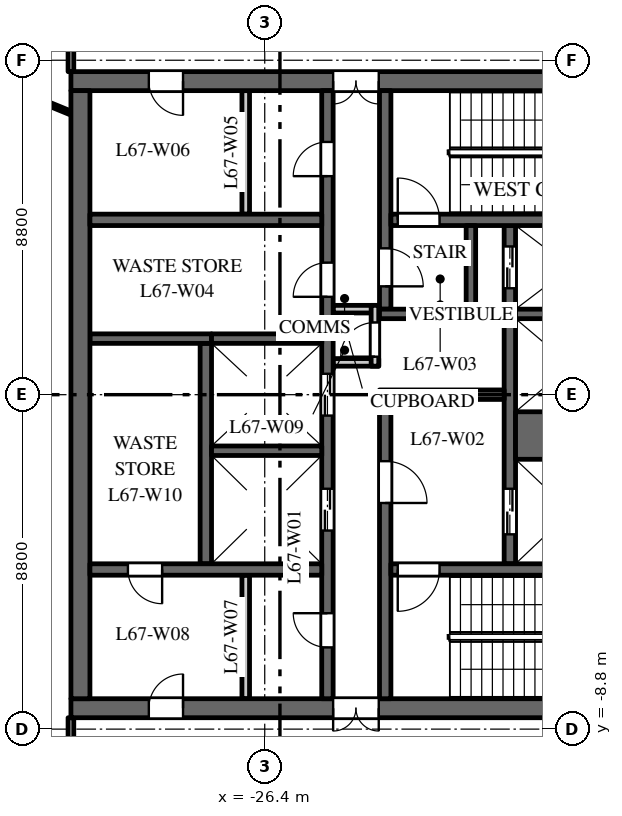
"""IFC4 building model, lengths in metres.
Left out: names, types, materials, properties, quantities, classifications, styles, units other than length and angle.
Written with IfcOpenShell. Run it as: python <this file> out.ifc"""

import sys

from ifc_helpers import new_model, si_unit, direction, frame, frame_2d, origin, place, context, subcontext, project, spatial, rectangle, extrude, element, fill, save


model = new_model("IFC4")
c1 = context("Model", 3, precision=1e-05, world=origin(), true_north=direction((0.0, 1.0)))
c2 = subcontext(c1, "Body", "Model", "MODEL_VIEW")
j1 = project(units=[si_unit("LENGTHUNIT", "METRE"), si_unit("PLANEANGLEUNIT", "RADIAN")], contexts=[c1])
p1 = place(None, origin())
s1 = spatial("IfcSite", under=j1, at=p1, CompositionType="ELEMENT")
p2 = place(p1, origin())
s2 = spatial("IfcBuilding", under=s1, at=p2, CompositionType="ELEMENT")
p3 = place(p2, frame((0.0, 0.0, 311.0)))
s3 = spatial("IfcBuildingStorey", under=s2, at=p3, CompositionType="ELEMENT", Elevation=311.0)
p4 = place(p3, frame((-16.5, 8.25, 0.0), z_axis=(0.0, 0.0, 1.0), x_axis=(-1.0, 0.0, 0.0)))
e1 = element("IfcWall", 1, at=p4, inside=s3, PredefinedType="SHEAR", context=c2, shape_type="SweptSolid", body=[
    extrude(rectangle(XDim=15.0, YDim=0.5, at=frame_2d((7.5, 0.0))), origin(), (0.0, 0.0, 1.0), 3.7),
])
p5 = place(p4, frame((6.9, 0.0, 0.0)))
e2 = element("IfcOpeningElement", 2, at=p5, cuts=e1, PredefinedType="OPENING", context=c2, shape_type="SweptSolid", body=[
    extrude(rectangle(XDim=1.2, YDim=2.1, at=frame_2d((0.6, 1.05))), frame((0.0, 0.26, 0.0), z_axis=(0.0, -1.0, 0.0), x_axis=(1.0, 0.0, 0.0)), (0.0, 0.0, 1.0), 0.52),
])
p6 = place(p4, frame((12.05, 0.0, 0.0)))
e3 = element("IfcOpeningElement", 3, at=p6, cuts=e1, PredefinedType="OPENING", context=c2, shape_type="SweptSolid", body=[
    extrude(rectangle(XDim=0.9, YDim=2.1, at=frame_2d((0.45, 1.05))), frame((0.0, 0.26, 0.0), z_axis=(0.0, -1.0, 0.0), x_axis=(1.0, 0.0, 0.0)), (0.0, 0.0, 1.0), 0.52),
])
p7 = place(p3, frame((-16.5, -8.25, 0.0), z_axis=(0.0, 0.0, 1.0), x_axis=(-1.0, 0.0, 0.0)))
e4 = element("IfcWall", 4, at=p7, inside=s3, PredefinedType="SHEAR", context=c2, shape_type="SweptSolid", body=[
    extrude(rectangle(XDim=15.0, YDim=0.5, at=frame_2d((7.5, 0.0))), origin(), (0.0, 0.0, 1.0), 3.7),
])
p8 = place(p7, frame((6.9, 0.0, 0.0)))
e5 = element("IfcOpeningElement", 5, at=p8, cuts=e4, PredefinedType="OPENING", context=c2, shape_type="SweptSolid", body=[
    extrude(rectangle(XDim=1.2, YDim=2.1, at=frame_2d((0.6, 1.05))), frame((0.0, 0.26, 0.0), z_axis=(0.0, -1.0, 0.0), x_axis=(1.0, 0.0, 0.0)), (0.0, 0.0, 1.0), 0.52),
])
p9 = place(p7, frame((12.05, 0.0, 0.0)))
e6 = element("IfcOpeningElement", 6, at=p9, cuts=e4, PredefinedType="OPENING", context=c2, shape_type="SweptSolid", body=[
    extrude(rectangle(XDim=0.9, YDim=2.1, at=frame_2d((0.45, 1.05))), frame((0.0, 0.26, 0.0), z_axis=(0.0, -1.0, 0.0), x_axis=(1.0, 0.0, 0.0)), (0.0, 0.0, 1.0), 0.52),
])
p10 = place(p3, frame((-27.95, -4.45, 0.0), z_axis=(0.0, 0.0, 1.0), x_axis=(0.0, 1.0, 0.0)))
e7 = element("IfcWall", 7, at=p10, inside=s3, PredefinedType="SHEAR", context=c2, shape_type="SweptSolid", body=[
    extrude(rectangle(XDim=5.8, YDim=0.3, at=frame_2d((2.9, 0.0))), origin(), (0.0, 0.0, 1.0), 3.7),
])
p11 = place(p3, frame((-27.8, 1.475, 0.0), z_axis=(0.0, 0.0, 1.0), x_axis=(-1.0, 0.0, 0.0)))
e8 = element("IfcWall", 8, at=p11, inside=s3, PredefinedType="SHEAR", context=c2, shape_type="SweptSolid", body=[
    extrude(rectangle(XDim=3.2, YDim=0.25, at=frame_2d((1.6, 0.0))), origin(), (0.0, 0.0, 1.0), 3.7),
])
p12 = place(p3, frame((-19.95, -4.45, 0.0), z_axis=(0.0, 0.0, 1.0), x_axis=(0.0, 1.0, 0.0)))
e9 = element("IfcWall", 9, at=p12, inside=s3, PredefinedType="SHEAR", context=c2, shape_type="SweptSolid", body=[
    extrude(rectangle(XDim=8.9, YDim=0.3, at=frame_2d((4.45, 0.0))), origin(), (0.0, 0.0, 1.0), 3.7),
])
p13 = place(p12, frame((0.775, 0.0, 0.0)))
e10 = element("IfcOpeningElement", 10, at=p13, cuts=e9, PredefinedType="OPENING", context=c2, shape_type="SweptSolid", body=[
    extrude(rectangle(XDim=1.2, YDim=2.1, at=frame_2d((0.6, 1.05))), frame((0.0, 0.16, 0.0), z_axis=(0.0, -1.0, 0.0), x_axis=(1.0, 0.0, 0.0)), (0.0, 0.0, 1.0), 0.32),
])
p14 = place(p12, frame((7.25, 0.0, 0.0)))
e11 = element("IfcOpeningElement", 11, at=p14, cuts=e9, PredefinedType="OPENING", context=c2, shape_type="SweptSolid", body=[
    extrude(rectangle(XDim=1.1, YDim=2.1, at=frame_2d((0.55, 1.05))), frame((0.0, 0.16, 0.0), z_axis=(0.0, -1.0, 0.0), x_axis=(1.0, 0.0, 0.0)), (0.0, 0.0, 1.0), 0.32),
])
p15 = place(p3, frame((-24.75, -8.0, 0.0), z_axis=(0.0, 0.0, 1.0), x_axis=(0.0, 1.0, 0.0)))
e12 = element("IfcWall", 12, at=p15, inside=s3, PredefinedType="SHEAR", context=c2, shape_type="SweptSolid", body=[
    extrude(rectangle(XDim=16.0, YDim=0.3, at=frame_2d((8.0, 0.0))), origin(), (0.0, 0.0, 1.0), 3.7),
])
p16 = place(p15, frame((4.425, 0.0, 0.0)))
e13 = element("IfcOpeningElement", 13, at=p16, cuts=e12, PredefinedType="OPENING", context=c2, shape_type="SweptSolid", body=[
    extrude(rectangle(XDim=1.1, YDim=2.1, at=frame_2d((0.55, 1.05))), frame((0.0, 0.16, 0.0), z_axis=(0.0, -1.0, 0.0), x_axis=(1.0, 0.0, 0.0)), (0.0, 0.0, 1.0), 0.32),
])
p17 = place(p15, frame((7.45, 0.0, 0.0)))
e14 = element("IfcOpeningElement", 14, at=p17, cuts=e12, PredefinedType="OPENING", context=c2, shape_type="SweptSolid", body=[
    extrude(rectangle(XDim=1.1, YDim=2.1, at=frame_2d((0.55, 1.05))), frame((0.0, 0.16, 0.0), z_axis=(0.0, -1.0, 0.0), x_axis=(1.0, 0.0, 0.0)), (0.0, 0.0, 1.0), 0.32),
])
p18 = place(p15, frame((10.575, 0.0, 0.0)))
e15 = element("IfcOpeningElement", 15, at=p18, cuts=e12, PredefinedType="OPENING", context=c2, shape_type="SweptSolid", body=[
    extrude(rectangle(XDim=0.9, YDim=2.1, at=frame_2d((0.45, 1.05))), frame((0.0, 0.16, 0.0), z_axis=(0.0, -1.0, 0.0), x_axis=(1.0, 0.0, 0.0)), (0.0, 0.0, 1.0), 0.32),
])
p19 = place(p15, frame((13.75, 0.0, 0.0)))
e16 = element("IfcOpeningElement", 16, at=p19, cuts=e12, PredefinedType="OPENING", context=c2, shape_type="SweptSolid", body=[
    extrude(rectangle(XDim=0.9, YDim=2.1, at=frame_2d((0.45, 1.05))), frame((0.0, 0.16, 0.0), z_axis=(0.0, -1.0, 0.0), x_axis=(1.0, 0.0, 0.0)), (0.0, 0.0, 1.0), 0.32),
])
p20 = place(p15, frame((1.35, 0.0, 0.0)))
e17 = element("IfcOpeningElement", 17, at=p20, cuts=e12, PredefinedType="OPENING", context=c2, shape_type="SweptSolid", body=[
    extrude(rectangle(XDim=0.9, YDim=2.1, at=frame_2d((0.45, 1.05))), frame((0.0, 0.16, 0.0), z_axis=(0.0, -1.0, 0.0), x_axis=(1.0, 0.0, 0.0)), (0.0, 0.0, 1.0), 0.32),
])
p21 = place(p3, frame((-20.1, 0.0, 0.0), z_axis=(0.0, 0.0, 1.0), x_axis=(-1.0, 0.0, 0.0)))
e18 = element("IfcWall", 18, at=p21, inside=s3, PredefinedType="SHEAR", context=c2, shape_type="SweptSolid", body=[
    extrude(rectangle(XDim=3.28, YDim=0.25, at=frame_2d((1.64, 0.0))), origin(), (0.0, 0.0, 1.0), 3.7),
])
for number, where, z_axis, x_axis in (
    (19, (-23.4, 0.85, 0.0), (0.0, 0.0, 1.0), (-1.0, 0.0, 0.0)),
    (20, (-23.4, 2.25, 0.0), (0.0, 0.0, 1.0), (-1.0, 0.0, 0.0)),
):
    element("IfcWall", number, at=place(p3, frame(where, z_axis=z_axis, x_axis=x_axis)), inside=s3, PredefinedType="PARTITIONING", context=c2, shape_type="SweptSolid", body=[
        extrude(rectangle(XDim=1.2, YDim=0.2, at=frame_2d((0.6, 0.0))), origin(), (0.0, 0.0, 1.0), 3.7),
    ])
p22 = place(p3, frame((-23.5, 0.75, 0.0), z_axis=(0.0, 0.0, 1.0), x_axis=(0.0, 1.0, 0.0)))
e21 = element("IfcWall", 21, at=p22, inside=s3, PredefinedType="PARTITIONING", context=c2, shape_type="SweptSolid", body=[
    extrude(rectangle(XDim=1.6, YDim=0.2, at=frame_2d((0.8, 0.0))), origin(), (0.0, 0.0, 1.0), 3.7),
])
p23 = place(p22, frame((0.25, 0.0, 0.0)))
e22 = element("IfcOpeningElement", 22, at=p23, cuts=e21, PredefinedType="OPENING", context=c2, shape_type="SweptSolid", body=[
    extrude(rectangle(XDim=0.9, YDim=2.1, at=frame_2d((0.45, 1.05))), frame((0.0, 0.11, 0.0), z_axis=(0.0, -1.0, 0.0), x_axis=(1.0, 0.0, 0.0)), (0.0, 0.0, 1.0), 0.22),
])
p24 = place(p3, frame((-31.25, -8.0, 0.0), z_axis=(0.0, 0.0, 1.0), x_axis=(0.0, 1.0, 0.0)))
e23 = element("IfcWall", 23, at=p24, inside=s3, PredefinedType="SHEAR", context=c2, shape_type="SweptSolid", body=[
    extrude(rectangle(XDim=16.0, YDim=0.5, at=frame_2d((8.0, 0.0))), origin(), (0.0, 0.0, 1.0), 3.7),
])
p25 = place(p3, frame((-24.9, 4.6, 0.0), z_axis=(0.0, 0.0, 1.0), x_axis=(-1.0, 0.0, 0.0)))
e24 = element("IfcWall", 24, at=p25, inside=s3, PredefinedType="SHEAR", context=c2, shape_type="SweptSolid", body=[
    extrude(rectangle(XDim=6.1, YDim=0.3, at=frame_2d((3.05, 0.0))), origin(), (0.0, 0.0, 1.0), 3.7),
])
for number, where, z_axis, x_axis in (
    (25, (-26.9, 4.75, 0.0), (0.0, 0.0, 1.0), (0.0, 1.0, 0.0)),
    (26, (-26.9, -8.0, 0.0), (0.0, 0.0, 1.0), (0.0, 1.0, 0.0)),
):
    element("IfcWall", number, at=place(p3, frame(where, z_axis=z_axis, x_axis=x_axis)), inside=s3, PredefinedType="PARTITIONING", context=c2, shape_type="SweptSolid", body=[
        extrude(rectangle(XDim=3.25, YDim=0.2, at=frame_2d((1.625, 0.0))), origin(), (0.0, 0.0, 1.0), 3.7),
    ])
p26 = place(p3, frame((-24.9, -4.6, 0.0), z_axis=(0.0, 0.0, 1.0), x_axis=(-1.0, 0.0, 0.0)))
e27 = element("IfcWall", 27, at=p26, inside=s3, PredefinedType="SHEAR", context=c2, shape_type="SweptSolid", body=[
    extrude(rectangle(XDim=6.1, YDim=0.3, at=frame_2d((3.05, 0.0))), origin(), (0.0, 0.0, 1.0), 3.7),
])
p27 = place(p26, frame((4.2, 0.0, 0.0)))
e28 = element("IfcOpeningElement", 28, at=p27, cuts=e27, PredefinedType="OPENING", context=c2, shape_type="SweptSolid", body=[
    extrude(rectangle(XDim=0.9, YDim=2.1, at=frame_2d((0.45, 1.05))), frame((0.0, 0.16, 0.0), z_axis=(0.0, -1.0, 0.0), x_axis=(1.0, 0.0, 0.0)), (0.0, 0.0, 1.0), 0.32),
])
p28 = place(p3, frame((-16.9, -1.075, 0.0), z_axis=(0.0, 0.0, 1.0), x_axis=(-1.0, 0.0, 0.0)))
e29 = element("IfcWall", 29, at=p28, inside=s3, PredefinedType="SHEAR", context=c2, shape_type="SweptSolid", body=[
    extrude(rectangle(XDim=2.9, YDim=1.25, at=frame_2d((1.45, 0.0))), origin(), (0.0, 0.0, 1.0), 3.7),
])
for number, where, z_axis, x_axis in (
    (30, (-16.9, 2.125, 0.0), (0.0, 0.0, 1.0), (-1.0, 0.0, 0.0)),
    (31, (-24.9, -1.475, 0.0), (0.0, 0.0, 1.0), (-1.0, 0.0, 0.0)),
    (32, (-24.9, 1.475, 0.0), (0.0, 0.0, 1.0), (-1.0, 0.0, 0.0)),
):
    element("IfcWall", number, at=place(p3, frame(where, z_axis=z_axis, x_axis=x_axis)), inside=s3, PredefinedType="SHEAR", context=c2, shape_type="SweptSolid", body=[
        extrude(rectangle(XDim=2.9, YDim=0.25, at=frame_2d((1.45, 0.0))), origin(), (0.0, 0.0, 1.0), 3.7),
    ])
p29 = place(p3, frame((-23.23, 2.25, 0.0), z_axis=(0.0, 0.0, 1.0), x_axis=(0.0, 1.0, 0.0)))
e33 = element("IfcWall", 33, at=p29, inside=s3, PredefinedType="SHEAR", context=c2, shape_type="SweptSolid", body=[
    extrude(rectangle(XDim=5.75, YDim=0.3, at=frame_2d((2.875, 0.0))), origin(), (0.0, 0.0, 1.0), 3.7),
])
p30 = place(p29, frame((0.6, 0.0, 0.0)))
e34 = element("IfcOpeningElement", 34, at=p30, cuts=e33, PredefinedType="OPENING", context=c2, shape_type="SweptSolid", body=[
    extrude(rectangle(XDim=1.0, YDim=2.1, at=frame_2d((0.5, 1.05))), frame((0.0, 0.16, 0.0), z_axis=(0.0, -1.0, 0.0), x_axis=(1.0, 0.0, 0.0)), (0.0, 0.0, 1.0), 0.32),
])
p31 = place(p3, frame((-23.23, -8.0, 0.0), z_axis=(0.0, 0.0, 1.0), x_axis=(0.0, 1.0, 0.0)))
e35 = element("IfcWall", 35, at=p31, inside=s3, PredefinedType="SHEAR", context=c2, shape_type="SweptSolid", body=[
    extrude(rectangle(XDim=7.875, YDim=0.3, at=frame_2d((3.938, 0.0))), origin(), (0.0, 0.0, 1.0), 3.7),
])
p32 = place(p31, frame((5.15, 0.0, 0.0)))
e36 = element("IfcOpeningElement", 36, at=p32, cuts=e35, PredefinedType="OPENING", context=c2, shape_type="SweptSolid", body=[
    extrude(rectangle(XDim=1.1, YDim=2.1, at=frame_2d((0.55, 1.05))), frame((0.0, 0.16, 0.0), z_axis=(0.0, -1.0, 0.0), x_axis=(1.0, 0.0, 0.0)), (0.0, 0.0, 1.0), 0.32),
])
p33 = place(p3, frame((-16.9, 4.6, 0.0), z_axis=(0.0, 0.0, 1.0), x_axis=(-1.0, 0.0, 0.0)))
e37 = element("IfcWall", 37, at=p33, inside=s3, PredefinedType="SHEAR", context=c2, shape_type="SweptSolid", body=[
    extrude(rectangle(XDim=6.18, YDim=0.3, at=frame_2d((3.09, 0.0))), origin(), (0.0, 0.0, 1.0), 3.7),
])
p34 = place(p33, frame((4.9, 0.0, 0.0)))
e38 = element("IfcOpeningElement", 38, at=p34, cuts=e37, PredefinedType="OPENING", context=c2, shape_type="SweptSolid", body=[
    extrude(rectangle(XDim=1.1, YDim=2.1, at=frame_2d((0.55, 1.05))), frame((0.0, 0.16, 0.0), z_axis=(0.0, -1.0, 0.0), x_axis=(1.0, 0.0, 0.0)), (0.0, 0.0, 1.0), 0.32),
])
p35 = place(p3, frame((-16.9, -4.6, 0.0), z_axis=(0.0, 0.0, 1.0), x_axis=(-1.0, 0.0, 0.0)))
e39 = element("IfcWall", 39, at=p35, inside=s3, PredefinedType="SHEAR", context=c2, shape_type="SweptSolid", body=[
    extrude(rectangle(XDim=6.18, YDim=0.3, at=frame_2d((3.09, 0.0))), origin(), (0.0, 0.0, 1.0), 3.7),
])
p36 = place(p35, frame((4.9, 0.0, 0.0)))
e40 = element("IfcOpeningElement", 40, at=p36, cuts=e39, PredefinedType="OPENING", context=c2, shape_type="SweptSolid", body=[
    extrude(rectangle(XDim=1.1, YDim=2.1, at=frame_2d((0.55, 1.05))), frame((0.0, 0.16, 0.0), z_axis=(0.0, -1.0, 0.0), x_axis=(1.0, 0.0, 0.0)), (0.0, 0.0, 1.0), 0.32),
])
p37 = place(p3, frame((-20.85, 2.125, 0.0), z_axis=(0.0, 0.0, 1.0), x_axis=(-1.0, 0.0, 0.0)))
e41 = element("IfcWall", 41, at=p37, inside=s3, PredefinedType="SHEAR", context=c2, shape_type="SweptSolid", body=[
    extrude(rectangle(XDim=2.53, YDim=0.25, at=frame_2d((1.265, 0.0))), origin(), (0.0, 0.0, 1.0), 3.7),
])
p38 = place(p3, frame((-20.975, 2.25, 0.0), z_axis=(0.0, 0.0, 1.0), x_axis=(0.0, 1.0, 0.0)))
e42 = element("IfcWall", 42, at=p38, inside=s3, PredefinedType="SHEAR", context=c2, shape_type="SweptSolid", body=[
    extrude(rectangle(XDim=2.2, YDim=0.25, at=frame_2d((1.1, 0.0))), origin(), (0.0, 0.0, 1.0), 3.7),
])
p39 = place(p3, frame((-34.234, 8.53, 0.0), z_axis=(0.0, 0.0, 1.0), x_axis=(0.925344112436, -0.379128307542, 0.0)))
e43 = element("IfcWall", 43, at=p39, inside=s3, PredefinedType="PARTITIONING", context=c2, shape_type="SweptSolid", body=[
    extrude(rectangle(XDim=2.954, YDim=0.1, at=frame_2d((1.477, 0.0))), origin(), (0.0, 0.0, 1.0), 3.0),
])
for number, where, z_axis, x_axis in (
    (44, (-31.5, -11.5, 0.0), (0.0, 0.0, 1.0), (0.0, 1.0, 0.0)),
    (45, (-31.5, 8.5, 0.0), (0.0, 0.0, 1.0), (0.0, 1.0, 0.0)),
):
    element("IfcWall", number, at=place(p3, frame(where, z_axis=z_axis, x_axis=x_axis)), inside=s3, PredefinedType="PARTITIONING", context=c2, shape_type="SweptSolid", body=[
        extrude(rectangle(XDim=3.0, YDim=0.15, at=frame_2d((1.5, 0.0))), origin(), (0.0, 0.0, 1.0), 3.0),
    ])
p40 = place(p13, origin())
e46 = element("IfcDoor", 46, at=p40, inside=s3, OperationType="DOUBLE_DOOR_SLIDING", PredefinedType="DOOR", context=c2, shape_type="SweptSolid", body=[
    extrude(rectangle(XDim=1.2, YDim=2.1, at=frame_2d((0.6, 1.05))), frame((0.0, 0.025, 0.0), z_axis=(0.0, -1.0, 0.0), x_axis=(1.0, 0.0, 0.0)), (0.0, 0.0, 1.0), 0.05),
])
fill(e10, e46)
p41 = place(p14, origin())
e47 = element("IfcDoor", 47, at=p41, inside=s3, OperationType="DOUBLE_DOOR_SLIDING", PredefinedType="DOOR", context=c2, shape_type="SweptSolid", body=[
    extrude(rectangle(XDim=1.1, YDim=2.1, at=frame_2d((0.55, 1.05))), frame((0.0, 0.025, 0.0), z_axis=(0.0, -1.0, 0.0), x_axis=(1.0, 0.0, 0.0)), (0.0, 0.0, 1.0), 0.05),
])
fill(e11, e47)
p42 = place(p16, origin())
e48 = element("IfcDoor", 48, at=p42, inside=s3, OperationType="DOUBLE_DOOR_SLIDING", PredefinedType="DOOR", context=c2, shape_type="SweptSolid", body=[
    extrude(rectangle(XDim=1.1, YDim=2.1, at=frame_2d((0.55, 1.05))), frame((0.0, 0.025, 0.0), z_axis=(0.0, -1.0, 0.0), x_axis=(1.0, 0.0, 0.0)), (0.0, 0.0, 1.0), 0.05),
])
fill(e13, e48)
p43 = place(p17, origin())
e49 = element("IfcDoor", 49, at=p43, inside=s3, OperationType="DOUBLE_DOOR_SLIDING", PredefinedType="DOOR", context=c2, shape_type="SweptSolid", body=[
    extrude(rectangle(XDim=1.1, YDim=2.1, at=frame_2d((0.55, 1.05))), frame((0.0, 0.025, 0.0), z_axis=(0.0, -1.0, 0.0), x_axis=(1.0, 0.0, 0.0)), (0.0, 0.0, 1.0), 0.05),
])
fill(e14, e49)
p44 = place(p34, origin())
e50 = element("IfcDoor", 50, at=p44, inside=s3, OperationType="SINGLE_SWING_RIGHT", PredefinedType="DOOR", context=c2, shape_type="SweptSolid", body=[
    extrude(rectangle(XDim=1.1, YDim=2.1, at=frame_2d((0.55, 1.05))), frame((0.0, 0.025, 0.0), z_axis=(0.0, -1.0, 0.0), x_axis=(1.0, 0.0, 0.0)), (0.0, 0.0, 1.0), 0.05),
])
fill(e38, e50)
p45 = place(p36, origin())
e51 = element("IfcDoor", 51, at=p45, inside=s3, OperationType="SINGLE_SWING_LEFT", PredefinedType="DOOR", context=c2, shape_type="SweptSolid", body=[
    extrude(rectangle(XDim=1.1, YDim=2.1, at=frame_2d((0.55, 1.05))), frame((0.0, 0.025, 0.0), z_axis=(0.0, -1.0, 0.0), x_axis=(1.0, 0.0, 0.0)), (0.0, 0.0, 1.0), 0.05),
])
fill(e40, e51)
p46 = place(p32, origin())
e52 = element("IfcDoor", 52, at=p46, inside=s3, OperationType="SINGLE_SWING_LEFT", PredefinedType="DOOR", context=c2, shape_type="SweptSolid", body=[
    extrude(rectangle(XDim=1.1, YDim=2.1, at=frame_2d((0.55, 1.05))), frame((0.0, 0.025, 0.0), z_axis=(0.0, -1.0, 0.0), x_axis=(1.0, 0.0, 0.0)), (0.0, 0.0, 1.0), 0.05),
])
fill(e36, e52)
p47 = place(p30, origin())
e53 = element("IfcDoor", 53, at=p47, inside=s3, OperationType="SINGLE_SWING_LEFT", PredefinedType="DOOR", context=c2, shape_type="SweptSolid", body=[
    extrude(rectangle(XDim=1.0, YDim=2.1, at=frame_2d((0.5, 1.05))), frame((0.0, 0.025, 0.0), z_axis=(0.0, -1.0, 0.0), x_axis=(1.0, 0.0, 0.0)), (0.0, 0.0, 1.0), 0.05),
])
fill(e34, e53)
p48 = place(p5, origin())
e54 = element("IfcDoor", 54, at=p48, inside=s3, OperationType="DOUBLE_DOOR_DOUBLE_SWING", PredefinedType="DOOR", context=c2, shape_type="SweptSolid", body=[
    extrude(rectangle(XDim=1.2, YDim=2.1, at=frame_2d((0.6, 1.05))), frame((0.0, 0.025, 0.0), z_axis=(0.0, -1.0, 0.0), x_axis=(1.0, 0.0, 0.0)), (0.0, 0.0, 1.0), 0.05),
])
fill(e2, e54)
p49 = place(p8, origin())
e55 = element("IfcDoor", 55, at=p49, inside=s3, OperationType="DOUBLE_DOOR_DOUBLE_SWING", PredefinedType="DOOR", context=c2, shape_type="SweptSolid", body=[
    extrude(rectangle(XDim=1.2, YDim=2.1, at=frame_2d((0.6, 1.05))), frame((0.0, 0.025, 0.0), z_axis=(0.0, -1.0, 0.0), x_axis=(1.0, 0.0, 0.0)), (0.0, 0.0, 1.0), 0.05),
])
fill(e5, e55)
p50 = place(p18, origin())
e56 = element("IfcDoor", 56, at=p50, inside=s3, OperationType="SINGLE_SWING_RIGHT", PredefinedType="DOOR", context=c2, shape_type="SweptSolid", body=[
    extrude(rectangle(XDim=0.9, YDim=2.1, at=frame_2d((0.45, 1.05))), frame((0.0, 0.025, 0.0), z_axis=(0.0, -1.0, 0.0), x_axis=(1.0, 0.0, 0.0)), (0.0, 0.0, 1.0), 0.05),
])
fill(e15, e56)
p51 = place(p19, origin())
e57 = element("IfcDoor", 57, at=p51, inside=s3, OperationType="SINGLE_SWING_RIGHT", PredefinedType="DOOR", context=c2, shape_type="SweptSolid", body=[
    extrude(rectangle(XDim=0.9, YDim=2.1, at=frame_2d((0.45, 1.05))), frame((0.0, 0.025, 0.0), z_axis=(0.0, -1.0, 0.0), x_axis=(1.0, 0.0, 0.0)), (0.0, 0.0, 1.0), 0.05),
])
fill(e16, e57)
p52 = place(p6, origin())
e58 = element("IfcDoor", 58, at=p52, inside=s3, OperationType="SINGLE_SWING_RIGHT", PredefinedType="DOOR", context=c2, shape_type="SweptSolid", body=[
    extrude(rectangle(XDim=0.9, YDim=2.1, at=frame_2d((0.45, 1.05))), frame((0.0, 0.025, 0.0), z_axis=(0.0, -1.0, 0.0), x_axis=(1.0, 0.0, 0.0)), (0.0, 0.0, 1.0), 0.05),
])
fill(e3, e58)
p53 = place(p20, origin())
e59 = element("IfcDoor", 59, at=p53, inside=s3, OperationType="SINGLE_SWING_LEFT", PredefinedType="DOOR", context=c2, shape_type="SweptSolid", body=[
    extrude(rectangle(XDim=0.9, YDim=2.1, at=frame_2d((0.45, 1.05))), frame((0.0, 0.025, 0.0), z_axis=(0.0, -1.0, 0.0), x_axis=(1.0, 0.0, 0.0)), (0.0, 0.0, 1.0), 0.05),
])
fill(e17, e59)
p54 = place(p9, origin())
e60 = element("IfcDoor", 60, at=p54, inside=s3, OperationType="SINGLE_SWING_LEFT", PredefinedType="DOOR", context=c2, shape_type="SweptSolid", body=[
    extrude(rectangle(XDim=0.9, YDim=2.1, at=frame_2d((0.45, 1.05))), frame((0.0, 0.025, 0.0), z_axis=(0.0, -1.0, 0.0), x_axis=(1.0, 0.0, 0.0)), (0.0, 0.0, 1.0), 0.05),
])
fill(e6, e60)
p55 = place(p23, origin())
e61 = element("IfcDoor", 61, at=p55, inside=s3, OperationType="SINGLE_SWING_RIGHT", PredefinedType="DOOR", context=c2, shape_type="SweptSolid", body=[
    extrude(rectangle(XDim=0.9, YDim=2.1, at=frame_2d((0.45, 1.05))), frame((0.0, 0.025, 0.0), z_axis=(0.0, -1.0, 0.0), x_axis=(1.0, 0.0, 0.0)), (0.0, 0.0, 1.0), 0.05),
])
fill(e22, e61)
p56 = place(p27, origin())
e62 = element("IfcDoor", 62, at=p56, inside=s3, OperationType="SINGLE_SWING_RIGHT", PredefinedType="DOOR", context=c2, shape_type="SweptSolid", body=[
    extrude(rectangle(XDim=0.9, YDim=2.1, at=frame_2d((0.45, 1.05))), frame((0.0, 0.025, 0.0), z_axis=(0.0, -1.0, 0.0), x_axis=(1.0, 0.0, 0.0)), (0.0, 0.0, 1.0), 0.05),
])
fill(e28, e62)
save(model, sys.argv[1])
